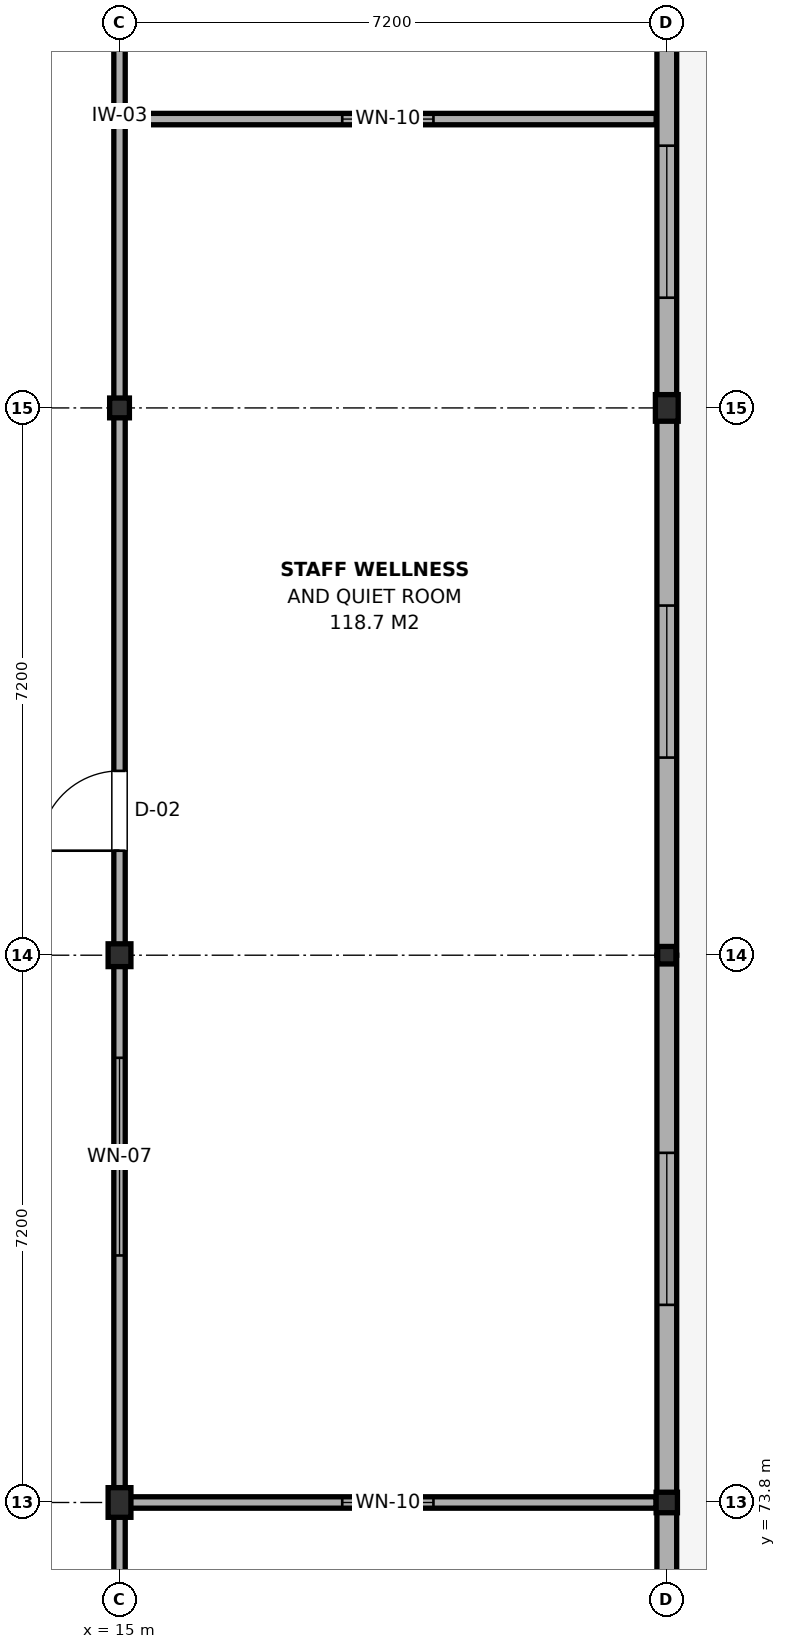
"""IFC4 building model, lengths in metres.
Left out: names, types, materials, properties, quantities, classifications, styles, units other than length and angle.
Written with IfcOpenShell. Run it as: python <this file> out.ifc"""

import sys

from ifc_helpers import new_model, si_unit, direction, frame, frame_2d, origin, origin_2d, place, context, subcontext, project, spatial, rectangle, i_section, extrude, element, fill, save


model = new_model("IFC4")
c1 = context("Model", 3, precision=1e-05, world=origin(), true_north=direction((0.0, 1.0)))
c2 = subcontext(c1, "Body", "Model", "MODEL_VIEW")
j1 = project(units=[si_unit("LENGTHUNIT", "METRE"), si_unit("PLANEANGLEUNIT", "RADIAN")], contexts=[c1])
p1 = place(None, origin())
s1 = spatial("IfcSite", under=j1, at=p1, CompositionType="ELEMENT")
p2 = place(p1, origin())
s2 = spatial("IfcBuilding", under=s1, at=p2, CompositionType="ELEMENT")
p3 = place(p2, frame((0.0, 0.0, 28.8)))
s3 = spatial("IfcBuildingStorey", under=s2, at=p3, CompositionType="ELEMENT", Elevation=28.8)
p4 = place(p3, frame((15.0, 73.8, 0.0), z_axis=(0.0, 0.0, 1.0), x_axis=(1.0, 0.0, 0.0)))
e1 = element("IfcColumn", 1, at=p4, inside=s3, PredefinedType="COLUMN", context=c2, shape_type="SweptSolid", body=[
    extrude(i_section(OverallWidth=0.3, OverallDepth=0.39, WebThickness=0.011, FlangeThickness=0.019, FilletRadius=0.027, at=origin_2d()), origin(), (0.0, 0.0, 1.0), 3.9),
])
p5 = place(p3, frame((15.0, 81.0, 0.0), z_axis=(0.0, 0.0, 1.0), x_axis=(1.0, 0.0, 0.0)))
e2 = element("IfcColumn", 2, at=p5, inside=s3, PredefinedType="COLUMN", context=c2, shape_type="SweptSolid", body=[
    extrude(i_section(OverallWidth=0.3, OverallDepth=0.3, WebThickness=0.011, FlangeThickness=0.019, FilletRadius=0.027, at=origin_2d()), origin(), (0.0, 0.0, 1.0), 3.9),
])
p6 = place(p3, frame((15.0, 88.2, 0.0), z_axis=(0.0, 0.0, 1.0), x_axis=(1.0, 0.0, 0.0)))
e3 = element("IfcColumn", 3, at=p6, inside=s3, PredefinedType="COLUMN", context=c2, shape_type="SweptSolid", body=[
    extrude(i_section(OverallWidth=0.26, OverallDepth=0.26, WebThickness=0.01, FlangeThickness=0.018, FilletRadius=0.024, at=origin_2d()), origin(), (0.0, 0.0, 1.0), 3.9),
])
p7 = place(p3, frame((22.2, 73.8, 0.0), z_axis=(0.0, 0.0, 1.0), x_axis=(1.0, 0.0, 0.0)))
e4 = element("IfcColumn", 4, at=p7, inside=s3, PredefinedType="COLUMN", context=c2, shape_type="SweptSolid", body=[
    extrude(i_section(OverallWidth=0.28, OverallDepth=0.27, WebThickness=0.008, FlangeThickness=0.013, FilletRadius=0.024, at=origin_2d()), origin(), (0.0, 0.0, 1.0), 3.72),
])
p8 = place(p3, frame((22.2, 81.0, 0.0), z_axis=(0.0, 0.0, 1.0), x_axis=(1.0, 0.0, 0.0)))
e5 = element("IfcColumn", 5, at=p8, inside=s3, PredefinedType="COLUMN", context=c2, shape_type="SweptSolid", body=[
    extrude(i_section(OverallWidth=0.24, OverallDepth=0.23, WebThickness=0.008, FlangeThickness=0.012, FilletRadius=0.021, at=origin_2d()), origin(), (0.0, 0.0, 1.0), 3.72),
])
p9 = place(p3, frame((22.2, 88.2, 0.0), z_axis=(0.0, 0.0, 1.0), x_axis=(1.0, 0.0, 0.0)))
e6 = element("IfcColumn", 6, at=p9, inside=s3, PredefinedType="COLUMN", context=c2, shape_type="SweptSolid", body=[
    extrude(i_section(OverallWidth=0.3, OverallDepth=0.35, WebThickness=0.01, FlangeThickness=0.018, FilletRadius=0.027, at=origin_2d()), origin(), (0.0, 0.0, 1.0), 3.72),
])
p10 = place(p3, frame((22.2, 66.6, 0.0), z_axis=(0.0, 0.0, 1.0), x_axis=(0.0, 1.0, 0.0)))
e7 = element("IfcWall", 7, at=p10, inside=s3, PredefinedType="SOLIDWALL", context=c2, shape_type="SweptSolid", body=[
    extrude(rectangle(XDim=7.2, YDim=0.26, at=frame_2d((3.6, 0.0))), origin(), (0.0, 0.0, 1.0), 3.165),
])
p11 = place(p10, frame((2.6, 0.0, 0.9)))
e8 = element("IfcOpeningElement", 8, at=p11, cuts=e7, PredefinedType="OPENING", context=c2, shape_type="SweptSolid", body=[
    extrude(rectangle(XDim=2.0, YDim=1.8, at=frame_2d((1.0, 0.9))), frame((0.0, 0.145, 0.0), z_axis=(0.0, -1.0, 0.0), x_axis=(1.0, 0.0, 0.0)), (0.0, 0.0, 1.0), 0.29),
])
p12 = place(p3, frame((22.2, 73.8, 0.0), z_axis=(0.0, 0.0, 1.0), x_axis=(0.0, 1.0, 0.0)))
e9 = element("IfcWall", 9, at=p12, inside=s3, PredefinedType="SOLIDWALL", context=c2, shape_type="SweptSolid", body=[
    extrude(rectangle(XDim=7.2, YDim=0.26, at=frame_2d((3.6, 0.0))), origin(), (0.0, 0.0, 1.0), 3.215),
])
p13 = place(p12, frame((2.6, 0.0, 0.9)))
e10 = element("IfcOpeningElement", 10, at=p13, cuts=e9, PredefinedType="OPENING", context=c2, shape_type="SweptSolid", body=[
    extrude(rectangle(XDim=2.0, YDim=1.8, at=frame_2d((1.0, 0.9))), frame((0.0, 0.145, 0.0), z_axis=(0.0, -1.0, 0.0), x_axis=(1.0, 0.0, 0.0)), (0.0, 0.0, 1.0), 0.29),
])
p14 = place(p3, frame((22.2, 81.0, 0.0), z_axis=(0.0, 0.0, 1.0), x_axis=(0.0, 1.0, 0.0)))
e11 = element("IfcWall", 11, at=p14, inside=s3, PredefinedType="SOLIDWALL", context=c2, shape_type="SweptSolid", body=[
    extrude(rectangle(XDim=7.2, YDim=0.26, at=frame_2d((3.6, 0.0))), origin(), (0.0, 0.0, 1.0), 3.265),
])
p15 = place(p14, frame((2.6, 0.0, 0.9)))
e12 = element("IfcOpeningElement", 12, at=p15, cuts=e11, PredefinedType="OPENING", context=c2, shape_type="SweptSolid", body=[
    extrude(rectangle(XDim=2.0, YDim=1.8, at=frame_2d((1.0, 0.9))), frame((0.0, 0.145, 0.0), z_axis=(0.0, -1.0, 0.0), x_axis=(1.0, 0.0, 0.0)), (0.0, 0.0, 1.0), 0.29),
])
p16 = place(p3, frame((22.2, 88.2, 0.0), z_axis=(0.0, 0.0, 1.0), x_axis=(0.0, 1.0, 0.0)))
e13 = element("IfcWall", 13, at=p16, inside=s3, PredefinedType="SOLIDWALL", context=c2, shape_type="SweptSolid", body=[
    extrude(rectangle(XDim=7.8, YDim=0.26, at=frame_2d((3.9, 0.0))), origin(), (0.0, 0.0, 1.0), 3.225),
])
p17 = place(p16, frame((1.45, 0.0, 0.9)))
e14 = element("IfcOpeningElement", 14, at=p17, cuts=e13, PredefinedType="OPENING", context=c2, shape_type="SweptSolid", body=[
    extrude(rectangle(XDim=2.0, YDim=1.8, at=frame_2d((1.0, 0.9))), frame((0.0, 0.145, 0.0), z_axis=(0.0, -1.0, 0.0), x_axis=(1.0, 0.0, 0.0)), (0.0, 0.0, 1.0), 0.29),
])
p18 = place(p3, frame((15.0, 47.6, 0.0), z_axis=(0.0, 0.0, 1.0), x_axis=(0.0, 1.0, 0.0)))
e15 = element("IfcWall", 15, at=p18, inside=s3, PredefinedType="PARTITIONING", context=c2, shape_type="SweptSolid", body=[
    extrude(rectangle(XDim=26.2, YDim=0.15, at=frame_2d((13.1, 0.0))), origin(), (0.0, 0.0, 1.0), 3.115),
])
p19 = place(p18, frame((12.3, 0.0, 0.0)))
e16 = element("IfcOpeningElement", 16, at=p19, cuts=e15, PredefinedType="OPENING", context=c2, shape_type="SweptSolid", body=[
    extrude(rectangle(XDim=1.6, YDim=2.15, at=frame_2d((0.8, 1.075))), frame((0.0, 0.09, 0.0), z_axis=(0.0, -1.0, 0.0), x_axis=(1.0, 0.0, 0.0)), (0.0, 0.0, 1.0), 0.18),
])
p20 = place(p3, frame((15.0, 73.8, 0.0), z_axis=(0.0, 0.0, 1.0), x_axis=(0.0, 1.0, 0.0)))
e17 = element("IfcWall", 17, at=p20, inside=s3, PredefinedType="PARTITIONING", context=c2, shape_type="SweptSolid", body=[
    extrude(rectangle(XDim=18.2, YDim=0.15, at=frame_2d((9.1, 0.0))), origin(), (0.0, 0.0, 1.0), 3.165),
])
p21 = place(p20, frame((8.575, 0.0, 0.0)))
e18 = element("IfcOpeningElement", 18, at=p21, cuts=e17, PredefinedType="OPENING", context=c2, shape_type="SweptSolid", body=[
    extrude(rectangle(XDim=1.05, YDim=2.15, at=frame_2d((0.525, 1.075))), frame((0.0, 0.09, 0.0), z_axis=(0.0, -1.0, 0.0), x_axis=(1.0, 0.0, 0.0)), (0.0, 0.0, 1.0), 0.18),
])
p22 = place(p20, frame((3.25, 0.0, 0.95)))
e19 = element("IfcOpeningElement", 19, at=p22, cuts=e17, PredefinedType="OPENING", context=c2, shape_type="SweptSolid", body=[
    extrude(rectangle(XDim=2.6, YDim=1.5, at=frame_2d((1.3, 0.75))), frame((0.0, 0.09, 0.0), z_axis=(0.0, -1.0, 0.0), x_axis=(1.0, 0.0, 0.0)), (0.0, 0.0, 1.0), 0.18),
])
p23 = place(p3, frame((15.0, 73.8, 0.0), z_axis=(0.0, 0.0, 1.0), x_axis=(1.0, 0.0, 0.0)))
e20 = element("IfcWall", 20, at=p23, inside=s3, PredefinedType="PARTITIONING", context=c2, shape_type="SweptSolid", body=[
    extrude(rectangle(XDim=7.06, YDim=0.15, at=frame_2d((3.53, 0.0))), origin(), (0.0, 0.0, 1.0), 3.165),
])
p24 = place(p23, frame((2.93, 0.0, 0.95)))
e21 = element("IfcOpeningElement", 21, at=p24, cuts=e20, PredefinedType="OPENING", context=c2, shape_type="SweptSolid", body=[
    extrude(rectangle(XDim=1.2, YDim=1.5, at=frame_2d((0.6, 0.75))), frame((0.0, 0.09, 0.0), z_axis=(0.0, -1.0, 0.0), x_axis=(1.0, 0.0, 0.0)), (0.0, 0.0, 1.0), 0.18),
])
p25 = place(p3, frame((15.0, 92.0, 0.0), z_axis=(0.0, 0.0, 1.0), x_axis=(0.0, 1.0, 0.0)))
e22 = element("IfcWall", 22, at=p25, inside=s3, PredefinedType="PARTITIONING", context=c2, shape_type="SweptSolid", body=[
    extrude(rectangle(XDim=8.447, YDim=0.15, at=frame_2d((4.224, 0.0))), origin(), (0.0, 0.0, 1.0), 3.175),
])
p26 = place(p25, frame((4.649, 0.0, 0.0)))
e23 = element("IfcOpeningElement", 23, at=p26, cuts=e22, PredefinedType="OPENING", context=c2, shape_type="SweptSolid", body=[
    extrude(rectangle(XDim=0.95, YDim=2.15, at=frame_2d((0.475, 1.075))), frame((0.0, 0.09, 0.0), z_axis=(0.0, -1.0, 0.0), x_axis=(1.0, 0.0, 0.0)), (0.0, 0.0, 1.0), 0.18),
])
p27 = place(p3, frame((15.0, 92.0, 0.0), z_axis=(0.0, 0.0, 1.0), x_axis=(1.0, 0.0, 0.0)))
e24 = element("IfcWall", 24, at=p27, inside=s3, PredefinedType="PARTITIONING", context=c2, shape_type="SweptSolid", body=[
    extrude(rectangle(XDim=7.06, YDim=0.15, at=frame_2d((3.53, 0.0))), origin(), (0.0, 0.0, 1.0), 3.365),
])
p28 = place(p27, frame((2.93, 0.0, 0.95)))
e25 = element("IfcOpeningElement", 25, at=p28, cuts=e24, PredefinedType="OPENING", context=c2, shape_type="SweptSolid", body=[
    extrude(rectangle(XDim=1.2, YDim=1.5, at=frame_2d((0.6, 0.75))), frame((0.0, 0.09, 0.0), z_axis=(0.0, -1.0, 0.0), x_axis=(1.0, 0.0, 0.0)), (0.0, 0.0, 1.0), 0.18),
])
p29 = place(p13, origin())
e26 = element("IfcWindow", 26, at=p29, inside=s3, PartitioningType="SINGLE_PANEL", PredefinedType="WINDOW", context=c2, shape_type="SweptSolid", body=[
    extrude(rectangle(XDim=2.0, YDim=1.8, at=frame_2d((1.0, 0.9))), frame((0.0, 0.03, 0.0), z_axis=(0.0, -1.0, 0.0), x_axis=(1.0, 0.0, 0.0)), (0.0, 0.0, 1.0), 0.06),
])
fill(e10, e26)
p30 = place(p15, origin())
e27 = element("IfcWindow", 27, at=p30, inside=s3, PartitioningType="SINGLE_PANEL", PredefinedType="WINDOW", context=c2, shape_type="SweptSolid", body=[
    extrude(rectangle(XDim=2.0, YDim=1.8, at=frame_2d((1.0, 0.9))), frame((0.0, 0.03, 0.0), z_axis=(0.0, -1.0, 0.0), x_axis=(1.0, 0.0, 0.0)), (0.0, 0.0, 1.0), 0.06),
])
fill(e12, e27)
p31 = place(p17, origin())
e28 = element("IfcWindow", 28, at=p31, inside=s3, PartitioningType="SINGLE_PANEL", PredefinedType="WINDOW", context=c2, shape_type="SweptSolid", body=[
    extrude(rectangle(XDim=2.0, YDim=1.8, at=frame_2d((1.0, 0.9))), frame((0.0, 0.03, 0.0), z_axis=(0.0, -1.0, 0.0), x_axis=(1.0, 0.0, 0.0)), (0.0, 0.0, 1.0), 0.06),
])
fill(e14, e28)
p32 = place(p21, origin())
e29 = element("IfcDoor", 29, at=p32, inside=s3, OperationType="SINGLE_SWING_LEFT", PredefinedType="DOOR", context=c2, shape_type="SweptSolid", body=[
    extrude(rectangle(XDim=1.05, YDim=2.15, at=frame_2d((0.525, 1.075))), frame((0.0, 0.025, 0.0), z_axis=(0.0, -1.0, 0.0), x_axis=(1.0, 0.0, 0.0)), (0.0, 0.0, 1.0), 0.05),
])
fill(e18, e29)
p33 = place(p22, origin())
e30 = element("IfcWindow", 30, at=p33, inside=s3, PartitioningType="SINGLE_PANEL", PredefinedType="WINDOW", context=c2, shape_type="SweptSolid", body=[
    extrude(rectangle(XDim=2.6, YDim=1.5, at=frame_2d((1.3, 0.75))), frame((0.0, 0.03, 0.0), z_axis=(0.0, -1.0, 0.0), x_axis=(1.0, 0.0, 0.0)), (0.0, 0.0, 1.0), 0.06),
])
fill(e19, e30)
p34 = place(p24, origin())
e31 = element("IfcWindow", 31, at=p34, inside=s3, PartitioningType="SINGLE_PANEL", PredefinedType="WINDOW", context=c2, shape_type="SweptSolid", body=[
    extrude(rectangle(XDim=1.2, YDim=1.5, at=frame_2d((0.6, 0.75))), frame((0.0, 0.03, 0.0), z_axis=(0.0, -1.0, 0.0), x_axis=(1.0, 0.0, 0.0)), (0.0, 0.0, 1.0), 0.06),
])
fill(e21, e31)
p35 = place(p28, origin())
e32 = element("IfcWindow", 32, at=p35, inside=s3, PartitioningType="SINGLE_PANEL", PredefinedType="WINDOW", context=c2, shape_type="SweptSolid", body=[
    extrude(rectangle(XDim=1.2, YDim=1.5, at=frame_2d((0.6, 0.75))), frame((0.0, 0.03, 0.0), z_axis=(0.0, -1.0, 0.0), x_axis=(1.0, 0.0, 0.0)), (0.0, 0.0, 1.0), 0.06),
])
fill(e25, e32)
save(model, sys.argv[1])
